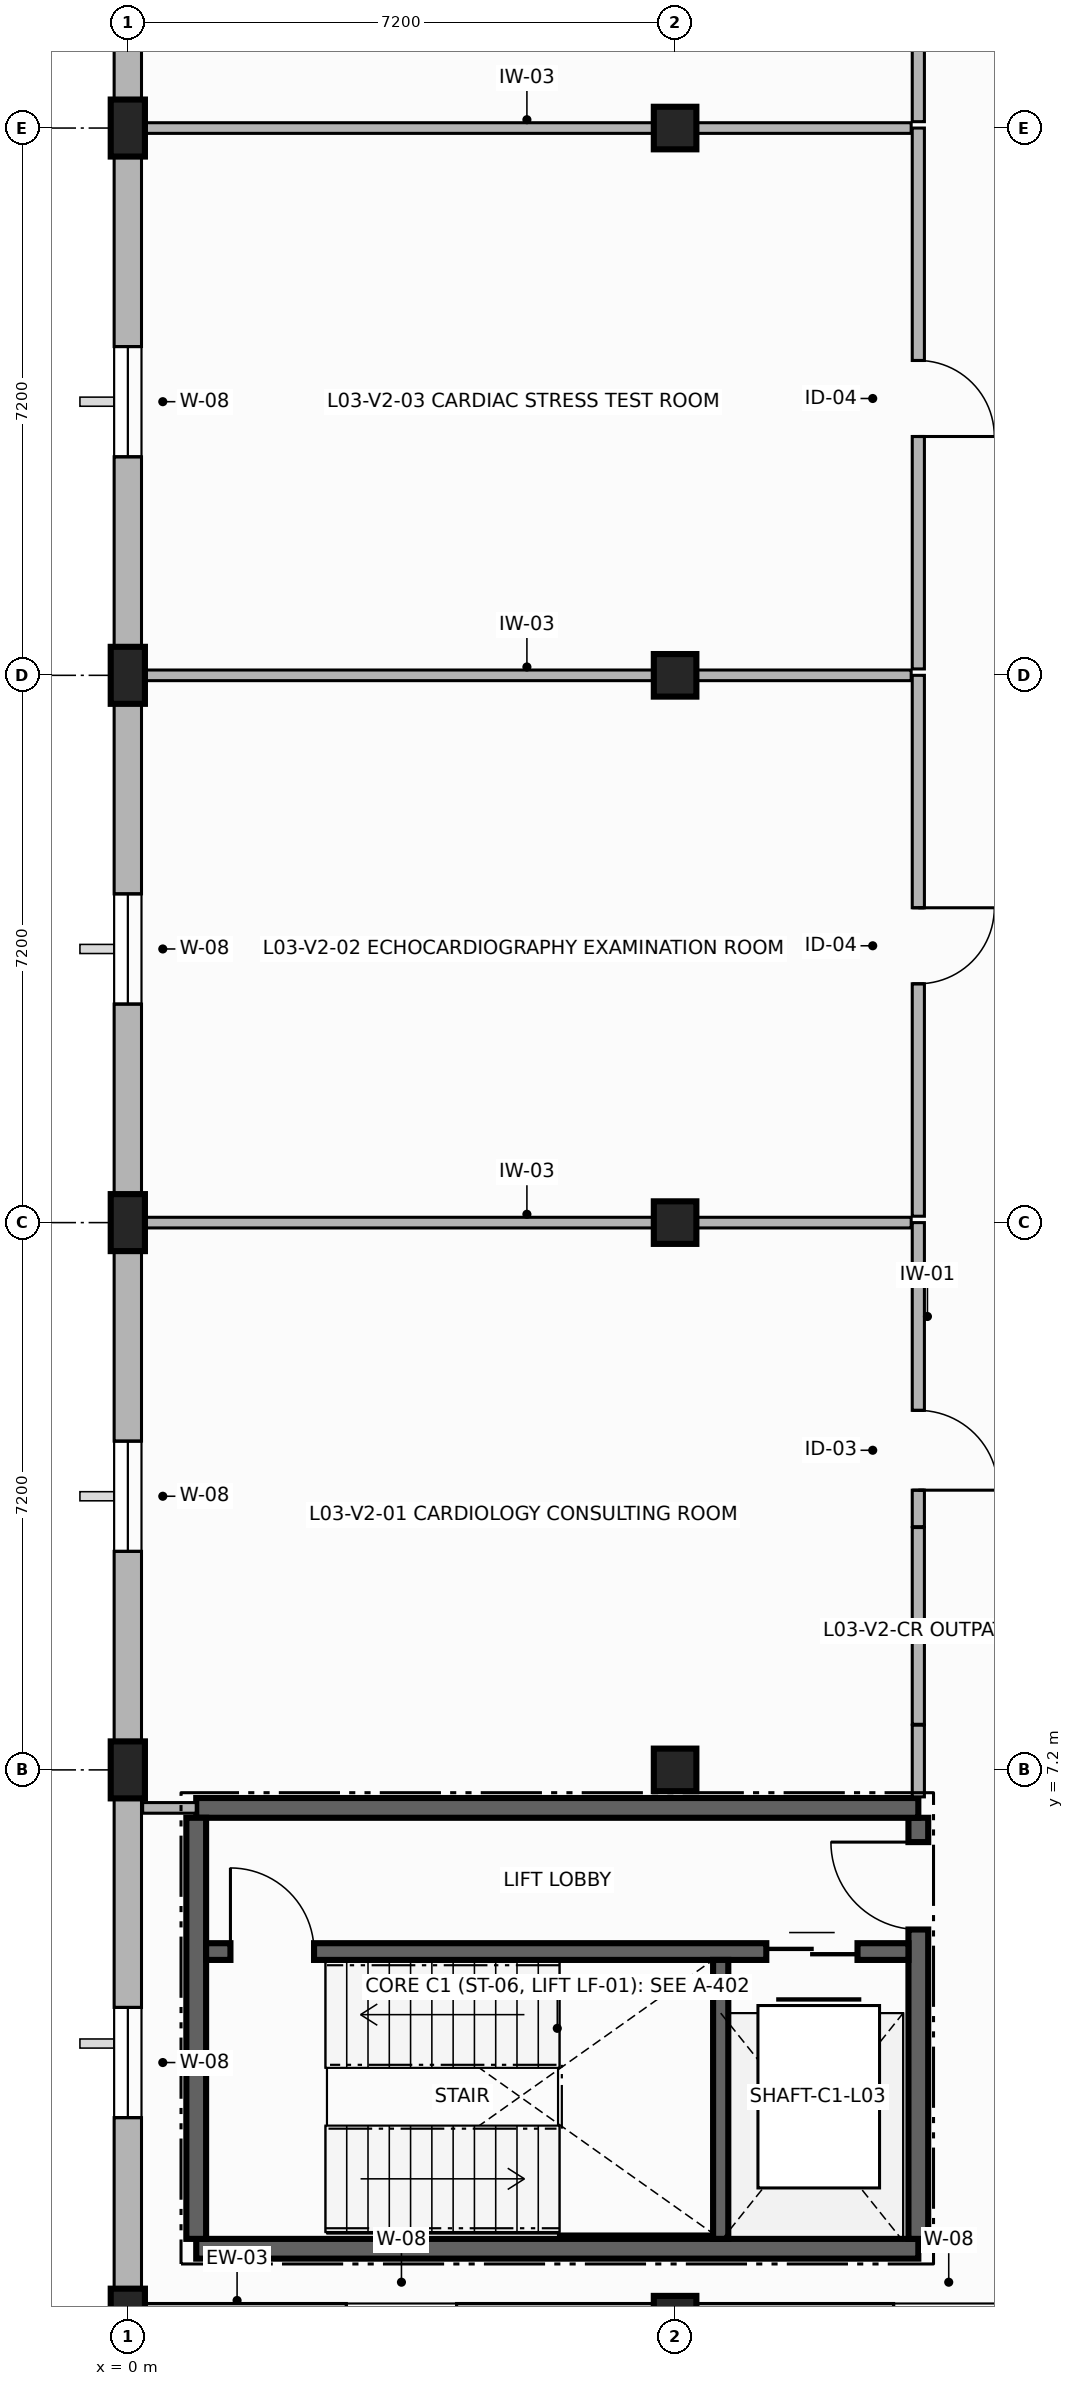
"""IFC4 building model, lengths in metres.
Left out: names, types, materials, properties, quantities, classifications, styles, units other than length and angle.
Written with IfcOpenShell. Run it as: python <this file> out.ifc"""

import sys

from ifc_helpers import new_model, si_unit, direction, frame, frame_2d, origin, origin_with_axes, origin_2d, place, context, subcontext, project, spatial, rectangle, extrude, element, fill, save


model = new_model("IFC4")
c1 = context("Model", 3, precision=1e-05, world=origin(), true_north=direction((0.0, 1.0)))
c2 = subcontext(c1, "Body", "Model", "MODEL_VIEW")
j1 = project(units=[si_unit("LENGTHUNIT", "METRE"), si_unit("PLANEANGLEUNIT", "RADIAN")], contexts=[c1])
p1 = place(None, origin())
s1 = spatial("IfcSite", under=j1, at=p1, CompositionType="ELEMENT")
p2 = place(p1, origin())
s2 = spatial("IfcBuilding", under=s1, at=p2, CompositionType="ELEMENT")
p3 = place(p2, frame((0.0, 0.0, 12.3)))
s3 = spatial("IfcBuildingStorey", under=s2, at=p3, CompositionType="ELEMENT", Elevation=12.3)
for number, where, z_axis, x_axis in (
    (1, (0.0, 0.0, 0.0), (0.0, 0.0, 1.0), (1.0, 0.0, 0.0)),
    (2, (0.0, 7.2, 0.0), (0.0, 0.0, 1.0), (1.0, 0.0, 0.0)),
    (3, (0.0, 14.4, 0.0), (0.0, 0.0, 1.0), (1.0, 0.0, 0.0)),
    (4, (0.0, 21.6, 0.0), (0.0, 0.0, 1.0), (1.0, 0.0, 0.0)),
    (5, (0.0, 28.8, 0.0), (0.0, 0.0, 1.0), (1.0, 0.0, 0.0)),
):
    element("IfcColumn", number, at=place(p3, frame(where, z_axis=z_axis, x_axis=x_axis)), inside=s3, PredefinedType="PILASTER", context=c2, shape_type="SweptSolid", body=[
        extrude(rectangle(XDim=0.45, YDim=0.75, at=origin_2d()), origin(), (0.0, 0.0, 1.0), 3.42),
    ])
for number, where, z_axis, x_axis in (
    (6, (7.2, 0.0, 0.0), (0.0, 0.0, 1.0), (1.0, 0.0, 0.0)),
    (7, (7.2, 7.2, 0.0), (0.0, 0.0, 1.0), (1.0, 0.0, 0.0)),
    (8, (7.2, 14.4, 0.0), (0.0, 0.0, 1.0), (1.0, 0.0, 0.0)),
    (9, (7.2, 21.6, 0.0), (0.0, 0.0, 1.0), (1.0, 0.0, 0.0)),
    (10, (7.2, 28.8, 0.0), (0.0, 0.0, 1.0), (1.0, 0.0, 0.0)),
):
    element("IfcColumn", number, at=place(p3, frame(where, z_axis=z_axis, x_axis=x_axis)), inside=s3, PredefinedType="COLUMN", context=c2, shape_type="SweptSolid", body=[
        extrude(rectangle(XDim=0.56, YDim=0.56, at=origin_2d()), origin(), (0.0, 0.0, 1.0), 3.42),
    ])
p4 = place(p3, origin_with_axes())
e11 = element("IfcWall", 11, at=p4, inside=s3, PredefinedType="SOLIDWALL", context=c2, shape_type="SweptSolid", body=[
    extrude(rectangle(XDim=7.2, YDim=0.36, at=frame_2d((3.6, 0.0))), origin(), (0.0, 0.0, 1.0), 2.8),
])
p5 = place(p4, frame((2.875, 0.0, 0.85)))
e12 = element("IfcOpeningElement", 12, at=p5, cuts=e11, PredefinedType="OPENING", context=c2, shape_type="SweptSolid", body=[
    extrude(rectangle(XDim=1.45, YDim=1.75, at=frame_2d((0.725, 0.875))), frame((0.0, 0.19, 0.0), z_axis=(0.0, -1.0, 0.0), x_axis=(1.0, 0.0, 0.0)), (0.0, 0.0, 1.0), 0.38),
])
p6 = place(p3, frame((7.2, 0.0, 0.0), z_axis=(0.0, 0.0, 1.0), x_axis=(1.0, 0.0, 0.0)))
e13 = element("IfcWall", 13, at=p6, inside=s3, PredefinedType="SOLIDWALL", context=c2, shape_type="SweptSolid", body=[
    extrude(rectangle(XDim=7.2, YDim=0.36, at=frame_2d((3.6, 0.0))), origin(), (0.0, 0.0, 1.0), 2.8),
])
p7 = place(p6, frame((2.875, 0.0, 0.85)))
e14 = element("IfcOpeningElement", 14, at=p7, cuts=e13, PredefinedType="OPENING", context=c2, shape_type="SweptSolid", body=[
    extrude(rectangle(XDim=1.45, YDim=1.75, at=frame_2d((0.725, 0.875))), frame((0.0, 0.19, 0.0), z_axis=(0.0, -1.0, 0.0), x_axis=(1.0, 0.0, 0.0)), (0.0, 0.0, 1.0), 0.38),
])
p8 = place(p3, frame((0.0, 36.0, 0.0), z_axis=(0.0, 0.0, 1.0), x_axis=(0.0, -1.0, 0.0)))
e15 = element("IfcWall", 15, at=p8, inside=s3, PredefinedType="SOLIDWALL", context=c2, shape_type="SweptSolid", body=[
    extrude(rectangle(XDim=7.2, YDim=0.36, at=frame_2d((3.6, 0.0))), origin(), (0.0, 0.0, 1.0), 2.8),
])
p9 = place(p8, frame((2.875, 0.0, 0.85)))
e16 = element("IfcOpeningElement", 16, at=p9, cuts=e15, PredefinedType="OPENING", context=c2, shape_type="SweptSolid", body=[
    extrude(rectangle(XDim=1.45, YDim=1.75, at=frame_2d((0.725, 0.875))), frame((0.0, 0.19, 0.0), z_axis=(0.0, -1.0, 0.0), x_axis=(1.0, 0.0, 0.0)), (0.0, 0.0, 1.0), 0.38),
])
p10 = place(p3, frame((0.0, 28.8, 0.0), z_axis=(0.0, 0.0, 1.0), x_axis=(0.0, -1.0, 0.0)))
e17 = element("IfcWall", 17, at=p10, inside=s3, PredefinedType="SOLIDWALL", context=c2, shape_type="SweptSolid", body=[
    extrude(rectangle(XDim=7.2, YDim=0.36, at=frame_2d((3.6, 0.0))), origin(), (0.0, 0.0, 1.0), 2.8),
])
p11 = place(p10, frame((2.875, 0.0, 0.85)))
e18 = element("IfcOpeningElement", 18, at=p11, cuts=e17, PredefinedType="OPENING", context=c2, shape_type="SweptSolid", body=[
    extrude(rectangle(XDim=1.45, YDim=1.75, at=frame_2d((0.725, 0.875))), frame((0.0, 0.19, 0.0), z_axis=(0.0, -1.0, 0.0), x_axis=(1.0, 0.0, 0.0)), (0.0, 0.0, 1.0), 0.38),
])
p12 = place(p3, frame((0.0, 21.6, 0.0), z_axis=(0.0, 0.0, 1.0), x_axis=(0.0, -1.0, 0.0)))
e19 = element("IfcWall", 19, at=p12, inside=s3, PredefinedType="SOLIDWALL", context=c2, shape_type="SweptSolid", body=[
    extrude(rectangle(XDim=7.2, YDim=0.36, at=frame_2d((3.6, 0.0))), origin(), (0.0, 0.0, 1.0), 2.8),
])
p13 = place(p12, frame((2.875, 0.0, 0.85)))
e20 = element("IfcOpeningElement", 20, at=p13, cuts=e19, PredefinedType="OPENING", context=c2, shape_type="SweptSolid", body=[
    extrude(rectangle(XDim=1.45, YDim=1.75, at=frame_2d((0.725, 0.875))), frame((0.0, 0.19, 0.0), z_axis=(0.0, -1.0, 0.0), x_axis=(1.0, 0.0, 0.0)), (0.0, 0.0, 1.0), 0.38),
])
p14 = place(p3, frame((0.0, 14.4, 0.0), z_axis=(0.0, 0.0, 1.0), x_axis=(0.0, -1.0, 0.0)))
e21 = element("IfcWall", 21, at=p14, inside=s3, PredefinedType="SOLIDWALL", context=c2, shape_type="SweptSolid", body=[
    extrude(rectangle(XDim=7.2, YDim=0.36, at=frame_2d((3.6, 0.0))), origin(), (0.0, 0.0, 1.0), 2.8),
])
p15 = place(p14, frame((2.875, 0.0, 0.85)))
e22 = element("IfcOpeningElement", 22, at=p15, cuts=e21, PredefinedType="OPENING", context=c2, shape_type="SweptSolid", body=[
    extrude(rectangle(XDim=1.45, YDim=1.75, at=frame_2d((0.725, 0.875))), frame((0.0, 0.19, 0.0), z_axis=(0.0, -1.0, 0.0), x_axis=(1.0, 0.0, 0.0)), (0.0, 0.0, 1.0), 0.38),
])
p16 = place(p3, frame((0.0, 7.2, 0.0), z_axis=(0.0, 0.0, 1.0), x_axis=(0.0, -1.0, 0.0)))
e23 = element("IfcWall", 23, at=p16, inside=s3, PredefinedType="SOLIDWALL", context=c2, shape_type="SweptSolid", body=[
    extrude(rectangle(XDim=7.2, YDim=0.36, at=frame_2d((3.6, 0.0))), origin(), (0.0, 0.0, 1.0), 2.8),
])
p17 = place(p16, frame((3.125, 0.0, 0.85)))
e24 = element("IfcOpeningElement", 24, at=p17, cuts=e23, PredefinedType="OPENING", context=c2, shape_type="SweptSolid", body=[
    extrude(rectangle(XDim=1.45, YDim=1.75, at=frame_2d((0.725, 0.875))), frame((0.0, 0.19, 0.0), z_axis=(0.0, -1.0, 0.0), x_axis=(1.0, 0.0, 0.0)), (0.0, 0.0, 1.0), 0.38),
])
p18 = place(p3, frame((0.9, 0.9, 0.0), z_axis=(0.0, 0.0, 1.0), x_axis=(1.0, 0.0, 0.0)))
e25 = element("IfcWall", 25, at=p18, inside=s3, PredefinedType="SHEAR", context=c2, shape_type="SweptSolid", body=[
    extrude(rectangle(XDim=9.5, YDim=0.26, at=frame_2d((4.75, 0.0))), origin(), (0.0, 0.0, 1.0), 3.42),
])
p19 = place(p3, frame((10.4, 1.03, 0.0), z_axis=(0.0, 0.0, 1.0), x_axis=(0.0, 1.0, 0.0)))
e26 = element("IfcWall", 26, at=p19, inside=s3, PredefinedType="SHEAR", context=c2, shape_type="SweptSolid", body=[
    extrude(rectangle(XDim=5.54, YDim=0.26, at=frame_2d((2.77, 0.0))), origin(), (0.0, 0.0, 1.0), 3.42),
])
p20 = place(p19, frame((4.07, 0.0, 0.0)))
e27 = element("IfcOpeningElement", 27, at=p20, cuts=e26, PredefinedType="OPENING", context=c2, shape_type="SweptSolid", body=[
    extrude(rectangle(XDim=1.15, YDim=2.2, at=frame_2d((0.575, 1.1))), frame((0.0, 0.14, 0.0), z_axis=(0.0, -1.0, 0.0), x_axis=(1.0, 0.0, 0.0)), (0.0, 0.0, 1.0), 0.28),
])
p21 = place(p3, frame((10.4, 6.7, 0.0), z_axis=(0.0, 0.0, 1.0), x_axis=(-1.0, 0.0, 0.0)))
e28 = element("IfcWall", 28, at=p21, inside=s3, PredefinedType="SHEAR", context=c2, shape_type="SweptSolid", body=[
    extrude(rectangle(XDim=9.5, YDim=0.26, at=frame_2d((4.75, 0.0))), origin(), (0.0, 0.0, 1.0), 3.42),
])
p22 = place(p3, frame((0.9, 6.57, 0.0), z_axis=(0.0, 0.0, 1.0), x_axis=(0.0, -1.0, 0.0)))
e29 = element("IfcWall", 29, at=p22, inside=s3, PredefinedType="SHEAR", context=c2, shape_type="SweptSolid", body=[
    extrude(rectangle(XDim=5.54, YDim=0.26, at=frame_2d((2.77, 0.0))), origin(), (0.0, 0.0, 1.0), 3.42),
])
p23 = place(p3, frame((1.03, 4.81, 0.0), z_axis=(0.0, 0.0, 1.0), x_axis=(1.0, 0.0, 0.0)))
e30 = element("IfcWall", 30, at=p23, inside=s3, PredefinedType="SHEAR", context=c2, shape_type="SweptSolid", body=[
    extrude(rectangle(XDim=9.24, YDim=0.22, at=frame_2d((4.62, 0.0))), origin(), (0.0, 0.0, 1.0), 3.42),
])
p24 = place(p23, frame((0.32, 0.0, 0.0)))
e31 = element("IfcOpeningElement", 31, at=p24, cuts=e30, PredefinedType="OPENING", context=c2, shape_type="SweptSolid", body=[
    extrude(rectangle(XDim=1.1, YDim=2.15, at=frame_2d((0.55, 1.075))), frame((0.0, 0.12, 0.0), z_axis=(0.0, -1.0, 0.0), x_axis=(1.0, 0.0, 0.0)), (0.0, 0.0, 1.0), 0.24),
])
p25 = place(p23, frame((7.37, 0.0, 0.0)))
e32 = element("IfcOpeningElement", 32, at=p25, cuts=e30, PredefinedType="OPENING", context=c2, shape_type="SweptSolid", body=[
    extrude(rectangle(XDim=1.2, YDim=2.2, at=frame_2d((0.6, 1.1))), frame((0.0, 0.12, 0.0), z_axis=(0.0, -1.0, 0.0), x_axis=(1.0, 0.0, 0.0)), (0.0, 0.0, 1.0), 0.24),
])
p26 = place(p3, frame((7.8, 1.03, 0.0), z_axis=(0.0, 0.0, 1.0), x_axis=(0.0, 1.0, 0.0)))
e33 = element("IfcWall", 33, at=p26, inside=s3, PredefinedType="SHEAR", context=c2, shape_type="SweptSolid", body=[
    extrude(rectangle(XDim=3.67, YDim=0.2, at=frame_2d((1.835, 0.0))), origin(), (0.0, 0.0, 1.0), 3.42),
])
p27 = place(p3, frame((10.4, 14.4, 0.0), z_axis=(0.0, 0.0, 1.0), x_axis=(0.0, -1.0, 0.0)))
e34 = element("IfcWall", 34, at=p27, inside=s3, PredefinedType="PARTITIONING", context=c2, shape_type="SweptSolid", body=[
    extrude(rectangle(XDim=4.0, YDim=0.16, at=frame_2d((2.0, 0.0))), origin(), (0.0, 0.0, 1.0), 2.78),
])
p28 = place(p27, frame((2.47, 0.0, 0.0)))
e35 = element("IfcOpeningElement", 35, at=p28, cuts=e34, PredefinedType="OPENING", context=c2, shape_type="SweptSolid", body=[
    extrude(rectangle(XDim=1.05, YDim=2.15, at=frame_2d((0.525, 1.075))), frame((0.0, 0.09, 0.0), z_axis=(0.0, -1.0, 0.0), x_axis=(1.0, 0.0, 0.0)), (0.0, 0.0, 1.0), 0.18),
])
p29 = place(p3, frame((10.4, 10.388, 0.0), z_axis=(0.0, 0.0, 1.0), x_axis=(0.0, -1.0, 0.0)))
e36 = element("IfcWall", 36, at=p29, inside=s3, PredefinedType="PARTITIONING", context=c2, shape_type="SweptSolid", body=[
    extrude(rectangle(XDim=2.588, YDim=0.16, at=frame_2d((1.294, 0.0))), origin(), (0.0, 0.0, 1.0), 2.78),
])
p30 = place(p3, frame((10.4, 7.788, 0.0), z_axis=(0.0, 0.0, 1.0), x_axis=(0.0, -1.0, 0.0)))
e37 = element("IfcWall", 37, at=p30, inside=s3, PredefinedType="PARTITIONING", context=c2, shape_type="SweptSolid", body=[
    extrude(rectangle(XDim=0.943, YDim=0.16, at=frame_2d((0.472, 0.0))), origin(), (0.0, 0.0, 1.0), 2.78),
])
p31 = place(p3, frame((0.9, 6.7, 0.0), z_axis=(0.0, 0.0, 1.0), x_axis=(-1.0, 0.0, 0.0)))
e38 = element("IfcWall", 38, at=p31, inside=s3, PredefinedType="PARTITIONING", context=c2, shape_type="SweptSolid", body=[
    extrude(rectangle(XDim=0.705, YDim=0.14, at=frame_2d((0.353, 0.0))), origin(), (0.0, 0.0, 1.0), 2.78),
])
p32 = place(p3, frame((0.195, 14.4, 0.0), z_axis=(0.0, 0.0, 1.0), x_axis=(1.0, 0.0, 0.0)))
e39 = element("IfcWall", 39, at=p32, inside=s3, PredefinedType="PARTITIONING", context=c2, shape_type="SweptSolid", body=[
    extrude(rectangle(XDim=10.111, YDim=0.14, at=frame_2d((5.055, 0.0))), origin(), (0.0, 0.0, 1.0), 2.78),
])
p33 = place(p3, frame((10.4, 21.6, 0.0), z_axis=(0.0, 0.0, 1.0), x_axis=(0.0, -1.0, 0.0)))
e40 = element("IfcWall", 40, at=p33, inside=s3, PredefinedType="PARTITIONING", context=c2, shape_type="SweptSolid", body=[
    extrude(rectangle(XDim=7.116, YDim=0.16, at=frame_2d((3.558, 0.0))), origin(), (0.0, 0.0, 1.0), 2.78),
])
p34 = place(p33, frame((3.058, 0.0, 0.0)))
e41 = element("IfcOpeningElement", 41, at=p34, cuts=e40, PredefinedType="OPENING", context=c2, shape_type="SweptSolid", body=[
    extrude(rectangle(XDim=1.0, YDim=2.15, at=frame_2d((0.5, 1.075))), frame((0.0, 0.09, 0.0), z_axis=(0.0, -1.0, 0.0), x_axis=(1.0, 0.0, 0.0)), (0.0, 0.0, 1.0), 0.18),
])
p35 = place(p3, frame((0.195, 21.6, 0.0), z_axis=(0.0, 0.0, 1.0), x_axis=(1.0, 0.0, 0.0)))
e42 = element("IfcWall", 42, at=p35, inside=s3, PredefinedType="PARTITIONING", context=c2, shape_type="SweptSolid", body=[
    extrude(rectangle(XDim=10.111, YDim=0.14, at=frame_2d((5.055, 0.0))), origin(), (0.0, 0.0, 1.0), 2.78),
])
p36 = place(p3, frame((10.4, 28.8, 0.0), z_axis=(0.0, 0.0, 1.0), x_axis=(0.0, -1.0, 0.0)))
e43 = element("IfcWall", 43, at=p36, inside=s3, PredefinedType="PARTITIONING", context=c2, shape_type="SweptSolid", body=[
    extrude(rectangle(XDim=7.116, YDim=0.16, at=frame_2d((3.558, 0.0))), origin(), (0.0, 0.0, 1.0), 2.78),
])
p37 = place(p36, frame((3.058, 0.0, 0.0)))
e44 = element("IfcOpeningElement", 44, at=p37, cuts=e43, PredefinedType="OPENING", context=c2, shape_type="SweptSolid", body=[
    extrude(rectangle(XDim=1.0, YDim=2.15, at=frame_2d((0.5, 1.075))), frame((0.0, 0.09, 0.0), z_axis=(0.0, -1.0, 0.0), x_axis=(1.0, 0.0, 0.0)), (0.0, 0.0, 1.0), 0.18),
])
p38 = place(p3, frame((0.195, 28.8, 0.0), z_axis=(0.0, 0.0, 1.0), x_axis=(1.0, 0.0, 0.0)))
e45 = element("IfcWall", 45, at=p38, inside=s3, PredefinedType="PARTITIONING", context=c2, shape_type="SweptSolid", body=[
    extrude(rectangle(XDim=10.111, YDim=0.14, at=frame_2d((5.055, 0.0))), origin(), (0.0, 0.0, 1.0), 2.78),
])
p39 = place(p3, frame((10.4, 36.655, 0.0), z_axis=(0.0, 0.0, 1.0), x_axis=(0.0, -1.0, 0.0)))
e46 = element("IfcWall", 46, at=p39, inside=s3, PredefinedType="PARTITIONING", context=c2, shape_type="SweptSolid", body=[
    extrude(rectangle(XDim=7.771, YDim=0.16, at=frame_2d((3.885, 0.0))), origin(), (0.0, 0.0, 1.0), 2.78),
])
p40 = place(p39, frame((3.538, 0.0, 0.0)))
e47 = element("IfcOpeningElement", 47, at=p40, cuts=e46, PredefinedType="OPENING", context=c2, shape_type="SweptSolid", body=[
    extrude(rectangle(XDim=1.4, YDim=2.3, at=frame_2d((0.7, 1.15))), frame((0.0, 0.09, 0.0), z_axis=(0.0, -1.0, 0.0), x_axis=(1.0, 0.0, 0.0)), (0.0, 0.0, 1.0), 0.18),
])
p41 = place(p11, origin())
e48 = element("IfcWindow", 48, at=p41, inside=s3, PartitioningType="SINGLE_PANEL", PredefinedType="WINDOW", context=c2, shape_type="SweptSolid", body=[
    extrude(rectangle(XDim=1.45, YDim=1.75, at=frame_2d((0.725, 0.875))), frame((0.0, 0.03, 0.0), z_axis=(0.0, -1.0, 0.0), x_axis=(1.0, 0.0, 0.0)), (0.0, 0.0, 1.0), 0.06),
])
fill(e18, e48)
p42 = place(p13, origin())
e49 = element("IfcWindow", 49, at=p42, inside=s3, PartitioningType="SINGLE_PANEL", PredefinedType="WINDOW", context=c2, shape_type="SweptSolid", body=[
    extrude(rectangle(XDim=1.45, YDim=1.75, at=frame_2d((0.725, 0.875))), frame((0.0, 0.03, 0.0), z_axis=(0.0, -1.0, 0.0), x_axis=(1.0, 0.0, 0.0)), (0.0, 0.0, 1.0), 0.06),
])
fill(e20, e49)
p43 = place(p15, origin())
e50 = element("IfcWindow", 50, at=p43, inside=s3, PartitioningType="SINGLE_PANEL", PredefinedType="WINDOW", context=c2, shape_type="SweptSolid", body=[
    extrude(rectangle(XDim=1.45, YDim=1.75, at=frame_2d((0.725, 0.875))), frame((0.0, 0.03, 0.0), z_axis=(0.0, -1.0, 0.0), x_axis=(1.0, 0.0, 0.0)), (0.0, 0.0, 1.0), 0.06),
])
fill(e22, e50)
p44 = place(p17, origin())
e51 = element("IfcWindow", 51, at=p44, inside=s3, PartitioningType="SINGLE_PANEL", PredefinedType="WINDOW", context=c2, shape_type="SweptSolid", body=[
    extrude(rectangle(XDim=1.45, YDim=1.75, at=frame_2d((0.725, 0.875))), frame((0.0, 0.03, 0.0), z_axis=(0.0, -1.0, 0.0), x_axis=(1.0, 0.0, 0.0)), (0.0, 0.0, 1.0), 0.06),
])
fill(e24, e51)
p45 = place(p24, origin())
e52 = element("IfcDoor", 52, at=p45, inside=s3, OperationType="SINGLE_SWING_LEFT", PredefinedType="DOOR", context=c2, shape_type="SweptSolid", body=[
    extrude(rectangle(XDim=1.1, YDim=2.15, at=frame_2d((0.55, 1.075))), frame((0.0, 0.025, 0.0), z_axis=(0.0, -1.0, 0.0), x_axis=(1.0, 0.0, 0.0)), (0.0, 0.0, 1.0), 0.05),
])
fill(e31, e52)
p46 = place(p25, origin())
e53 = element("IfcDoor", 53, at=p46, inside=s3, OperationType="DOUBLE_DOOR_SLIDING", PredefinedType="DOOR", context=c2, shape_type="SweptSolid", body=[
    extrude(rectangle(XDim=1.2, YDim=2.2, at=frame_2d((0.6, 1.1))), frame((0.0, 0.025, 0.0), z_axis=(0.0, -1.0, 0.0), x_axis=(1.0, 0.0, 0.0)), (0.0, 0.0, 1.0), 0.05),
])
fill(e32, e53)
p47 = place(p20, origin())
e54 = element("IfcDoor", 54, at=p47, inside=s3, OperationType="SINGLE_SWING_RIGHT", PredefinedType="DOOR", context=c2, shape_type="SweptSolid", body=[
    extrude(rectangle(XDim=1.15, YDim=2.2, at=frame_2d((0.575, 1.1))), frame((0.0, 0.025, 0.0), z_axis=(0.0, -1.0, 0.0), x_axis=(1.0, 0.0, 0.0)), (0.0, 0.0, 1.0), 0.05),
])
fill(e27, e54)
p48 = place(p28, origin())
e55 = element("IfcDoor", 55, at=p48, inside=s3, OperationType="SINGLE_SWING_RIGHT", PredefinedType="DOOR", context=c2, shape_type="SweptSolid", body=[
    extrude(rectangle(XDim=1.05, YDim=2.15, at=frame_2d((0.525, 1.075))), frame((0.0, 0.025, 0.0), z_axis=(0.0, -1.0, 0.0), x_axis=(1.0, 0.0, 0.0)), (0.0, 0.0, 1.0), 0.05),
])
fill(e35, e55)
p49 = place(p34, origin())
e56 = element("IfcDoor", 56, at=p49, inside=s3, OperationType="SINGLE_SWING_LEFT", PredefinedType="DOOR", context=c2, shape_type="SweptSolid", body=[
    extrude(rectangle(XDim=1.0, YDim=2.15, at=frame_2d((0.5, 1.075))), frame((0.0, 0.025, 0.0), z_axis=(0.0, -1.0, 0.0), x_axis=(1.0, 0.0, 0.0)), (0.0, 0.0, 1.0), 0.05),
])
fill(e41, e56)
p50 = place(p37, origin())
e57 = element("IfcDoor", 57, at=p50, inside=s3, OperationType="SINGLE_SWING_RIGHT", PredefinedType="DOOR", context=c2, shape_type="SweptSolid", body=[
    extrude(rectangle(XDim=1.0, YDim=2.15, at=frame_2d((0.5, 1.075))), frame((0.0, 0.025, 0.0), z_axis=(0.0, -1.0, 0.0), x_axis=(1.0, 0.0, 0.0)), (0.0, 0.0, 1.0), 0.05),
])
fill(e44, e57)
save(model, sys.argv[1])
